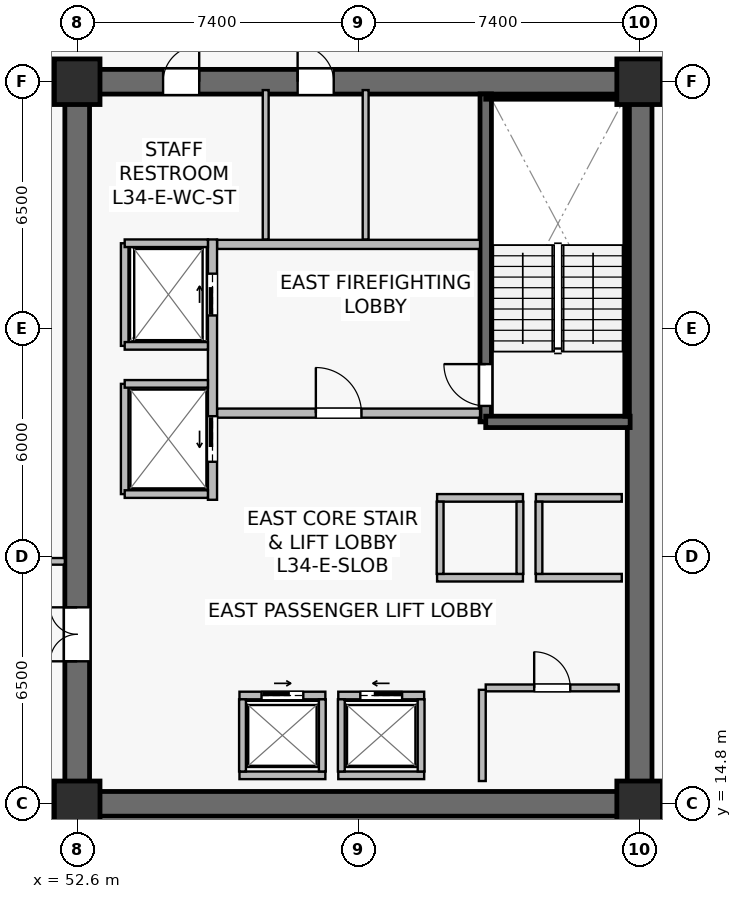
"""IFC4 building model, lengths in metres.
Left out: names, types, materials, properties, quantities, classifications, styles, units other than length and angle.
Written with IfcOpenShell. Run it as: python <this file> out.ifc"""

import sys

from ifc_helpers import new_model, si_unit, direction, frame, frame_2d, origin, origin_2d, place, context, subcontext, project, spatial, rectangle, extrude, source, transform, mapped, element, fill, save


model = new_model("IFC4")
c1 = context("Model", 3, precision=1e-05, world=origin(), true_north=direction((0.0, 1.0)))
c2 = subcontext(c1, "Body", "Model", "MODEL_VIEW")
j1 = project(units=[si_unit("LENGTHUNIT", "METRE"), si_unit("PLANEANGLEUNIT", "RADIAN")], contexts=[c1])
p1 = place(None, origin())
s1 = spatial("IfcSite", under=j1, at=p1, CompositionType="ELEMENT")
p2 = place(p1, origin())
s2 = spatial("IfcBuilding", under=s1, at=p2, CompositionType="ELEMENT")
p3 = place(p2, frame((0.0, 0.0, 142.0)))
s3 = spatial("IfcBuildingStorey", under=s2, at=p3, CompositionType="ELEMENT", Elevation=142.0)
p4 = place(p3, frame((52.275, 14.8, 0.0), z_axis=(0.0, 0.0, 1.0), x_axis=(1.0, 0.0, 0.0)))
e1 = element("IfcWall", 1, at=p4, inside=s3, PredefinedType="SHEAR", context=c2, shape_type="SweptSolid", body=[
    extrude(rectangle(XDim=15.45, YDim=0.65, at=frame_2d((7.725, 0.0))), origin(), (0.0, 0.0, 1.0), 3.79),
])
p5 = place(p3, frame((52.275, 33.8, 0.0), z_axis=(0.0, 0.0, 1.0), x_axis=(1.0, 0.0, 0.0)))
e2 = element("IfcWall", 2, at=p5, inside=s3, PredefinedType="SHEAR", context=c2, shape_type="SweptSolid", body=[
    extrude(rectangle(XDim=15.45, YDim=0.65, at=frame_2d((7.725, 0.0))), origin(), (0.0, 0.0, 1.0), 3.79),
])
p6 = place(p5, frame((6.125, 0.0, 0.0)))
e3 = element("IfcOpeningElement", 3, at=p6, cuts=e2, PredefinedType="OPENING", context=c2, shape_type="SweptSolid", body=[
    extrude(rectangle(XDim=0.95, YDim=2.15, at=frame_2d((0.475, 1.075))), frame((0.0, 0.335, 0.0), z_axis=(0.0, -1.0, 0.0), x_axis=(1.0, 0.0, 0.0)), (0.0, 0.0, 1.0), 0.67),
])
p7 = place(p5, frame((2.585, 0.0, 0.0)))
e4 = element("IfcOpeningElement", 4, at=p7, cuts=e2, PredefinedType="OPENING", context=c2, shape_type="SweptSolid", body=[
    extrude(rectangle(XDim=0.95, YDim=2.15, at=frame_2d((0.475, 1.075))), frame((0.0, 0.335, 0.0), z_axis=(0.0, -1.0, 0.0), x_axis=(1.0, 0.0, 0.0)), (0.0, 0.0, 1.0), 0.67),
])
p8 = place(p3, frame((52.6, 15.125, 0.0), z_axis=(0.0, 0.0, 1.0), x_axis=(0.0, 1.0, 0.0)))
e5 = element("IfcWall", 5, at=p8, inside=s3, PredefinedType="SHEAR", context=c2, shape_type="SweptSolid", body=[
    extrude(rectangle(XDim=18.35, YDim=0.65, at=frame_2d((9.175, 0.0))), origin(), (0.0, 0.0, 1.0), 3.79),
])
p9 = place(p8, frame((3.425, 0.0, 0.0)))
e6 = element("IfcOpeningElement", 6, at=p9, cuts=e5, PredefinedType="OPENING", context=c2, shape_type="SweptSolid", body=[
    extrude(rectangle(XDim=1.42, YDim=2.2, at=frame_2d((0.71, 1.1))), frame((0.0, 0.335, 0.0), z_axis=(0.0, -1.0, 0.0), x_axis=(1.0, 0.0, 0.0)), (0.0, 0.0, 1.0), 0.67),
])
p10 = place(p3, frame((67.4, 15.125, 0.0), z_axis=(0.0, 0.0, 1.0), x_axis=(0.0, 1.0, 0.0)))
e7 = element("IfcWall", 7, at=p10, inside=s3, PredefinedType="SHEAR", context=c2, shape_type="SweptSolid", body=[
    extrude(rectangle(XDim=18.35, YDim=0.65, at=frame_2d((9.175, 0.0))), origin(), (0.0, 0.0, 1.0), 3.79),
])
p11 = place(p3, frame((63.35, 24.85, 0.0), z_axis=(0.0, 0.0, 1.0), x_axis=(0.0, 1.0, 0.0)))
e8 = element("IfcWall", 8, at=p11, inside=s3, PredefinedType="SHEAR", context=c2, shape_type="SweptSolid", body=[
    extrude(rectangle(XDim=8.63, YDim=0.3, at=frame_2d((4.315, 0.0))), origin(), (0.0, 0.0, 1.0), 3.79),
])
p12 = place(p11, frame((0.42, 0.0, 0.0)))
e9 = element("IfcOpeningElement", 9, at=p12, cuts=e8, PredefinedType="OPENING", context=c2, shape_type="SweptSolid", body=[
    extrude(rectangle(XDim=1.1, YDim=2.15, at=frame_2d((0.55, 1.075))), frame((0.0, 0.16, 0.0), z_axis=(0.0, -1.0, 0.0), x_axis=(1.0, 0.0, 0.0)), (0.0, 0.0, 1.0), 0.32),
])
p13 = place(p3, frame((63.35, 24.85, 0.0), z_axis=(0.0, 0.0, 1.0), x_axis=(1.0, 0.0, 0.0)))
e10 = element("IfcWall", 10, at=p13, inside=s3, PredefinedType="SHEAR", context=c2, shape_type="SweptSolid", body=[
    extrude(rectangle(XDim=3.8, YDim=0.3, at=frame_2d((1.9, 0.0))), origin(), (0.0, 0.0, 1.0), 3.79),
])
p14 = place(p3, frame((63.35, 33.4, 0.0), z_axis=(0.0, 0.0, 1.0), x_axis=(1.0, 0.0, 0.0)))
e11 = element("IfcWall", 11, at=p14, inside=s3, PredefinedType="SOLIDWALL", context=c2, shape_type="SweptSolid", body=[
    extrude(rectangle(XDim=3.72, YDim=0.12, at=frame_2d((1.86, 0.0))), origin(), (0.0, 0.0, 1.0), 3.79),
])
p15 = place(p3, frame((67.07, 25.0, 0.0), z_axis=(0.0, 0.0, 1.0), x_axis=(0.0, 1.0, 0.0)))
e12 = element("IfcWall", 12, at=p15, inside=s3, PredefinedType="SOLIDWALL", context=c2, shape_type="SweptSolid", body=[
    extrude(rectangle(XDim=8.32, YDim=0.12, at=frame_2d((4.16, 0.0))), origin(), (0.0, 0.0, 1.0), 3.79),
])
m1 = source(origin(), c2, "Body", "SweptSolid", [
    extrude(rectangle(XDim=1.2, YDim=1.2, at=origin_2d()), origin(), (0.0, 0.0, 1.0), 4.1),
])
for number, where, z_axis, x_axis in (
    (13, (52.6, 14.8, 0.0), (0.0, 0.0, 1.0), (1.0, 0.0, 0.0)),
    (14, (67.4, 14.8, 0.0), (0.0, 0.0, 1.0), (1.0, 0.0, 0.0)),
    (15, (52.6, 33.8, 0.0), (0.0, 0.0, 1.0), (1.0, 0.0, 0.0)),
    (16, (67.4, 33.8, 0.0), (0.0, 0.0, 1.0), (1.0, 0.0, 0.0)),
):
    element("IfcColumn", number, at=place(p3, frame(where, z_axis=z_axis, x_axis=x_axis)), inside=s3, PredefinedType="COLUMN", context=c2, shape_type="MappedRepresentation", body=[
        mapped(m1, transform((0.0, 0.0, 0.0), scale=1.0)),
    ])
p16 = place(p3, frame((56.28, 25.08, 0.0), z_axis=(0.0, 0.0, 1.0), x_axis=(1.0, 0.0, 0.0)))
e17 = element("IfcWall", 17, at=p16, inside=s3, PredefinedType="SOLIDWALL", context=c2, shape_type="SweptSolid", body=[
    extrude(rectangle(XDim=6.92, YDim=0.24, at=frame_2d((3.46, 0.0))), origin(), (0.0, 0.0, 1.0), 3.125),
])
p17 = place(p16, frame((2.6, 0.0, 0.0)))
e18 = element("IfcOpeningElement", 18, at=p17, cuts=e17, PredefinedType="OPENING", context=c2, shape_type="SweptSolid", body=[
    extrude(rectangle(XDim=1.2, YDim=2.16, at=frame_2d((0.6, 1.08))), frame((0.0, 0.13, 0.0), z_axis=(0.0, -1.0, 0.0), x_axis=(1.0, 0.0, 0.0)), (0.0, 0.0, 1.0), 0.26),
])
p18 = place(p3, frame((56.28, 29.52, 0.0), z_axis=(0.0, 0.0, 1.0), x_axis=(1.0, 0.0, 0.0)))
e19 = element("IfcWall", 19, at=p18, inside=s3, PredefinedType="SOLIDWALL", context=c2, shape_type="SweptSolid", body=[
    extrude(rectangle(XDim=6.92, YDim=0.24, at=frame_2d((3.46, 0.0))), origin(), (0.0, 0.0, 1.0), 3.125),
])
p19 = place(p3, frame((56.16, 22.8, 0.0), z_axis=(0.0, 0.0, 1.0), x_axis=(0.0, 1.0, 0.0)))
e20 = element("IfcWall", 20, at=p19, inside=s3, PredefinedType="SOLIDWALL", context=c2, shape_type="SweptSolid", body=[
    extrude(rectangle(XDim=6.85, YDim=0.24, at=frame_2d((3.425, 0.0))), origin(), (0.0, 0.0, 1.0), 2.875),
])
p20 = place(p19, frame((4.85, 0.0, 0.0)))
e21 = element("IfcOpeningElement", 21, at=p20, cuts=e20, PredefinedType="OPENING", context=c2, shape_type="SweptSolid", body=[
    extrude(rectangle(XDim=1.1, YDim=2.22, at=frame_2d((0.55, 1.11))), frame((0.0, 0.13, 0.0), z_axis=(0.0, -1.0, 0.0), x_axis=(1.0, 0.0, 0.0)), (0.0, 0.0, 1.0), 0.26),
])
p21 = place(p19, frame((1.0, 0.0, 0.0)))
e22 = element("IfcOpeningElement", 22, at=p21, cuts=e20, PredefinedType="OPENING", context=c2, shape_type="SweptSolid", body=[
    extrude(rectangle(XDim=1.2, YDim=2.22, at=frame_2d((0.6, 1.11))), frame((0.0, 0.13, 0.0), z_axis=(0.0, -1.0, 0.0), x_axis=(1.0, 0.0, 0.0)), (0.0, 0.0, 1.0), 0.26),
])
p22 = place(p3, frame((59.47, 17.65, 0.0), z_axis=(0.0, 0.0, 1.0), x_axis=(1.0, 0.0, 0.0)))
e23 = element("IfcWall", 23, at=p22, inside=s3, PredefinedType="SOLIDWALL", context=c2, shape_type="SweptSolid", body=[
    extrude(rectangle(XDim=2.26, YDim=0.2, at=frame_2d((1.13, 0.0))), origin(), (0.0, 0.0, 1.0), 3.125),
])
p23 = place(p22, frame((0.58, 0.0, 0.0)))
e24 = element("IfcOpeningElement", 24, at=p23, cuts=e23, PredefinedType="OPENING", context=c2, shape_type="SweptSolid", body=[
    extrude(rectangle(XDim=1.1, YDim=2.22, at=frame_2d((0.55, 1.11))), frame((0.0, 0.11, 0.0), z_axis=(0.0, -1.0, 0.0), x_axis=(1.0, 0.0, 0.0)), (0.0, 0.0, 1.0), 0.22),
])
p24 = place(p3, frame((59.47, 15.55, 0.0), z_axis=(0.0, 0.0, 1.0), x_axis=(1.0, 0.0, 0.0)))
e25 = element("IfcWall", 25, at=p24, inside=s3, PredefinedType="SOLIDWALL", context=c2, shape_type="SweptSolid", body=[
    extrude(rectangle(XDim=2.26, YDim=0.2, at=frame_2d((1.13, 0.0))), origin(), (0.0, 0.0, 1.0), 3.125),
])
for number, where, z_axis, x_axis in (
    (26, (59.55, 15.65, 0.0), (0.0, 0.0, 1.0), (0.0, 1.0, 0.0)),
    (27, (61.65, 15.65, 0.0), (0.0, 0.0, 1.0), (0.0, 1.0, 0.0)),
):
    element("IfcWall", number, at=place(p3, frame(where, z_axis=z_axis, x_axis=x_axis)), inside=s3, PredefinedType="SOLIDWALL", context=c2, shape_type="SweptSolid", body=[
        extrude(rectangle(XDim=1.9, YDim=0.18, at=frame_2d((0.95, 0.0))), origin(), (0.0, 0.0, 1.0), 3.79),
    ])
p25 = place(p3, frame((56.87, 17.65, 0.0), z_axis=(0.0, 0.0, 1.0), x_axis=(1.0, 0.0, 0.0)))
e28 = element("IfcWall", 28, at=p25, inside=s3, PredefinedType="SOLIDWALL", context=c2, shape_type="SweptSolid", body=[
    extrude(rectangle(XDim=2.26, YDim=0.2, at=frame_2d((1.13, 0.0))), origin(), (0.0, 0.0, 1.0), 3.79),
])
p26 = place(p25, frame((0.58, 0.0, 0.0)))
e29 = element("IfcOpeningElement", 29, at=p26, cuts=e28, PredefinedType="OPENING", context=c2, shape_type="SweptSolid", body=[
    extrude(rectangle(XDim=1.1, YDim=2.22, at=frame_2d((0.55, 1.11))), frame((0.0, 0.11, 0.0), z_axis=(0.0, -1.0, 0.0), x_axis=(1.0, 0.0, 0.0)), (0.0, 0.0, 1.0), 0.22),
])
p27 = place(p3, frame((56.87, 15.55, 0.0), z_axis=(0.0, 0.0, 1.0), x_axis=(1.0, 0.0, 0.0)))
e30 = element("IfcWall", 30, at=p27, inside=s3, PredefinedType="SOLIDWALL", context=c2, shape_type="SweptSolid", body=[
    extrude(rectangle(XDim=2.26, YDim=0.2, at=frame_2d((1.13, 0.0))), origin(), (0.0, 0.0, 1.0), 3.79),
])
for number, where, z_axis, x_axis in (
    (31, (56.95, 15.65, 0.0), (0.0, 0.0, 1.0), (0.0, 1.0, 0.0)),
    (32, (59.05, 15.65, 0.0), (0.0, 0.0, 1.0), (0.0, 1.0, 0.0)),
):
    element("IfcWall", number, at=place(p3, frame(where, z_axis=z_axis, x_axis=x_axis)), inside=s3, PredefinedType="SOLIDWALL", context=c2, shape_type="SweptSolid", body=[
        extrude(rectangle(XDim=1.9, YDim=0.18, at=frame_2d((0.95, 0.0))), origin(), (0.0, 0.0, 1.0), 3.79),
    ])
for number, where, z_axis, x_axis in (
    (33, (64.67, 20.75, 0.0), (0.0, 0.0, 1.0), (1.0, 0.0, 0.0)),
    (34, (64.67, 22.85, 0.0), (0.0, 0.0, 1.0), (1.0, 0.0, 0.0)),
):
    element("IfcWall", number, at=place(p3, frame(where, z_axis=z_axis, x_axis=x_axis)), inside=s3, PredefinedType="SOLIDWALL", context=c2, shape_type="SweptSolid", body=[
        extrude(rectangle(XDim=2.26, YDim=0.2, at=frame_2d((1.13, 0.0))), origin(), (0.0, 0.0, 1.0), 3.79),
    ])
p28 = place(p3, frame((64.75, 20.85, 0.0), z_axis=(0.0, 0.0, 1.0), x_axis=(0.0, 1.0, 0.0)))
e35 = element("IfcWall", 35, at=p28, inside=s3, PredefinedType="SOLIDWALL", context=c2, shape_type="SweptSolid", body=[
    extrude(rectangle(XDim=1.9, YDim=0.18, at=frame_2d((0.95, 0.0))), origin(), (0.0, 0.0, 1.0), 3.79),
])
for number, where, z_axis, x_axis in (
    (36, (62.07, 20.75, 0.0), (0.0, 0.0, 1.0), (1.0, 0.0, 0.0)),
    (37, (62.07, 22.85, 0.0), (0.0, 0.0, 1.0), (1.0, 0.0, 0.0)),
):
    element("IfcWall", number, at=place(p3, frame(where, z_axis=z_axis, x_axis=x_axis)), inside=s3, PredefinedType="SOLIDWALL", context=c2, shape_type="SweptSolid", body=[
        extrude(rectangle(XDim=2.26, YDim=0.2, at=frame_2d((1.13, 0.0))), origin(), (0.0, 0.0, 1.0), 3.79),
    ])
for number, where, z_axis, x_axis in (
    (38, (62.15, 20.85, 0.0), (0.0, 0.0, 1.0), (0.0, 1.0, 0.0)),
    (39, (64.25, 20.85, 0.0), (0.0, 0.0, 1.0), (0.0, 1.0, 0.0)),
):
    element("IfcWall", number, at=place(p3, frame(where, z_axis=z_axis, x_axis=x_axis)), inside=s3, PredefinedType="SOLIDWALL", context=c2, shape_type="SweptSolid", body=[
        extrude(rectangle(XDim=1.9, YDim=0.18, at=frame_2d((0.95, 0.0))), origin(), (0.0, 0.0, 1.0), 3.79),
    ])
p29 = place(p3, frame((53.85, 26.85, 0.0), z_axis=(0.0, 0.0, 1.0), x_axis=(0.0, 1.0, 0.0)))
e40 = element("IfcWall", 40, at=p29, inside=s3, PredefinedType="SOLIDWALL", context=c2, shape_type="SweptSolid", body=[
    extrude(rectangle(XDim=2.7, YDim=0.2, at=frame_2d((1.35, 0.0))), origin(), (0.0, 0.0, 1.0), 3.79),
])
p30 = place(p3, frame((53.85, 29.55, 0.0), z_axis=(0.0, 0.0, 1.0), x_axis=(1.0, 0.0, 0.0)))
e41 = element("IfcWall", 41, at=p30, inside=s3, PredefinedType="SOLIDWALL", context=c2, shape_type="SweptSolid", body=[
    extrude(rectangle(XDim=2.19, YDim=0.2, at=frame_2d((1.095, 0.0))), origin(), (0.0, 0.0, 1.0), 3.79),
])
p31 = place(p3, frame((53.85, 26.85, 0.0), z_axis=(0.0, 0.0, 1.0), x_axis=(1.0, 0.0, 0.0)))
e42 = element("IfcWall", 42, at=p31, inside=s3, PredefinedType="SOLIDWALL", context=c2, shape_type="SweptSolid", body=[
    extrude(rectangle(XDim=2.19, YDim=0.2, at=frame_2d((1.095, 0.0))), origin(), (0.0, 0.0, 1.0), 3.187),
])
p32 = place(p3, frame((53.85, 22.95, 0.0), z_axis=(0.0, 0.0, 1.0), x_axis=(0.0, 1.0, 0.0)))
e43 = element("IfcWall", 43, at=p32, inside=s3, PredefinedType="SOLIDWALL", context=c2, shape_type="SweptSolid", body=[
    extrude(rectangle(XDim=2.9, YDim=0.2, at=frame_2d((1.45, 0.0))), origin(), (0.0, 0.0, 1.0), 2.875),
])
for number, where, z_axis, x_axis in (
    (44, (53.85, 25.85, 0.0), (0.0, 0.0, 1.0), (1.0, 0.0, 0.0)),
    (45, (53.85, 22.95, 0.0), (0.0, 0.0, 1.0), (1.0, 0.0, 0.0)),
):
    element("IfcWall", number, at=place(p3, frame(where, z_axis=z_axis, x_axis=x_axis)), inside=s3, PredefinedType="SOLIDWALL", context=c2, shape_type="SweptSolid", body=[
        extrude(rectangle(XDim=2.19, YDim=0.2, at=frame_2d((1.095, 0.0))), origin(), (0.0, 0.0, 1.0), 3.79),
    ])
p33 = place(p3, frame((63.35, 17.85, 0.0), z_axis=(0.0, 0.0, 1.0), x_axis=(1.0, 0.0, 0.0)))
e46 = element("IfcWall", 46, at=p33, inside=s3, PredefinedType="SOLIDWALL", context=c2, shape_type="SweptSolid", body=[
    extrude(rectangle(XDim=3.5, YDim=0.18, at=frame_2d((1.75, 0.0))), origin(), (0.0, 0.0, 1.0), 3.79),
])
p34 = place(p33, frame((1.275, 0.0, 0.0)))
e47 = element("IfcOpeningElement", 47, at=p34, cuts=e46, PredefinedType="OPENING", context=c2, shape_type="SweptSolid", body=[
    extrude(rectangle(XDim=0.95, YDim=2.15, at=frame_2d((0.475, 1.075))), frame((0.0, 0.1, 0.0), z_axis=(0.0, -1.0, 0.0), x_axis=(1.0, 0.0, 0.0)), (0.0, 0.0, 1.0), 0.2),
])
p35 = place(p3, frame((63.26, 15.4, 0.0), z_axis=(0.0, 0.0, 1.0), x_axis=(0.0, 1.0, 0.0)))
e48 = element("IfcWall", 48, at=p35, inside=s3, PredefinedType="SOLIDWALL", context=c2, shape_type="SweptSolid", body=[
    extrude(rectangle(XDim=2.4, YDim=0.18, at=frame_2d((1.2, 0.0))), origin(), (0.0, 0.0, 1.0), 3.79),
])
p36 = place(p3, frame((60.19, 29.65, 0.0), z_axis=(0.0, 0.0, 1.0), x_axis=(0.0, 1.0, 0.0)))
e49 = element("IfcWall", 49, at=p36, inside=s3, PredefinedType="PLUMBINGWALL", context=c2, shape_type="SweptSolid", body=[
    extrude(rectangle(XDim=3.93, YDim=0.155, at=frame_2d((1.965, 0.0))), origin(), (0.0, 0.0, 1.0), 3.125),
])
p37 = place(p3, frame((57.56, 29.65, 0.0), z_axis=(0.0, 0.0, 1.0), x_axis=(0.0, 1.0, 0.0)))
e50 = element("IfcWall", 50, at=p37, inside=s3, PredefinedType="PLUMBINGWALL", context=c2, shape_type="SweptSolid", body=[
    extrude(rectangle(XDim=3.93, YDim=0.155, at=frame_2d((1.965, 0.0))), origin(), (0.0, 0.0, 1.0), 3.79),
])
p38 = place(p3, frame((48.3, 34.26, 0.0), z_axis=(0.0, 0.0, 1.0), x_axis=(1.0, 0.0, 0.0)))
e51 = element("IfcWall", 51, at=p38, inside=s3, PredefinedType="PARTITIONING", context=c2, shape_type="SweptSolid", body=[
    extrude(rectangle(XDim=3.975, YDim=0.175, at=frame_2d((1.987, 0.0))), origin(), (0.0, 0.0, 1.0), 3.475),
])
p39 = place(p3, frame((48.3, 21.18, 0.0), z_axis=(0.0, 0.0, 1.0), x_axis=(1.0, 0.0, 0.0)))
e52 = element("IfcWall", 52, at=p39, inside=s3, PredefinedType="PARTITIONING", context=c2, shape_type="SweptSolid", body=[
    extrude(rectangle(XDim=3.975, YDim=0.175, at=frame_2d((1.987, 0.0))), origin(), (0.0, 0.0, 1.0), 3.79),
])
p40 = place(p39, frame((1.35, 0.0, 0.0)))
e53 = element("IfcOpeningElement", 53, at=p40, cuts=e52, PredefinedType="OPENING", context=c2, shape_type="SweptSolid", body=[
    extrude(rectangle(XDim=0.95, YDim=2.15, at=frame_2d((0.475, 1.075))), frame((0.0, 0.098, 0.0), z_axis=(0.0, -1.0, 0.0), x_axis=(1.0, 0.0, 0.0)), (0.0, 0.0, 1.0), 0.195),
])
m2 = source(origin(), c2, "Body", "SweptSolid", [
    extrude(rectangle(XDim=1.1, YDim=2.15, at=frame_2d((0.55, 1.075))), frame((0.0, 0.025, 0.0), z_axis=(0.0, -1.0, 0.0), x_axis=(1.0, 0.0, 0.0)), (0.0, 0.0, 1.0), 0.05),
])
p41 = place(p12, origin())
e54 = element("IfcDoor", 54, at=p41, inside=s3, OperationType="SINGLE_SWING_RIGHT", PredefinedType="DOOR", context=c2, shape_type="MappedRepresentation", body=[
    mapped(m2, transform((0.0, 0.0, 0.0), scale=1.0)),
])
fill(e9, e54)
m3 = source(origin(), c2, "Body", "SweptSolid", [
    extrude(rectangle(XDim=1.2, YDim=2.16, at=frame_2d((0.6, 1.08))), frame((0.0, 0.025, 0.0), z_axis=(0.0, -1.0, 0.0), x_axis=(1.0, 0.0, 0.0)), (0.0, 0.0, 1.0), 0.05),
])
p42 = place(p17, origin())
e55 = element("IfcDoor", 55, at=p42, inside=s3, OperationType="SINGLE_SWING_LEFT", PredefinedType="DOOR", context=c2, shape_type="MappedRepresentation", body=[
    mapped(m3, transform((0.0, 0.0, 0.0), scale=1.0)),
])
fill(e18, e55)
m4 = source(origin(), c2, "Body", "SweptSolid", [
    extrude(rectangle(XDim=1.1, YDim=2.22, at=frame_2d((0.55, 1.11))), frame((0.0, 0.025, 0.0), z_axis=(0.0, -1.0, 0.0), x_axis=(1.0, 0.0, 0.0)), (0.0, 0.0, 1.0), 0.05),
])
p43 = place(p23, origin())
e56 = element("IfcDoor", 56, at=p43, inside=s3, OperationType="SLIDING_TO_LEFT", PredefinedType="USERDEFINED", context=c2, shape_type="MappedRepresentation", body=[
    mapped(m4, transform((0.0, 0.0, 0.0), scale=1.0)),
])
fill(e24, e56)
p44 = place(p26, origin())
e57 = element("IfcDoor", 57, at=p44, inside=s3, OperationType="SLIDING_TO_RIGHT", PredefinedType="USERDEFINED", context=c2, shape_type="MappedRepresentation", body=[
    mapped(m4, transform((0.0, 0.0, 0.0), scale=1.0)),
])
fill(e29, e57)
p45 = place(p20, origin())
e58 = element("IfcDoor", 58, at=p45, inside=s3, OperationType="SLIDING_TO_RIGHT", PredefinedType="USERDEFINED", context=c2, shape_type="MappedRepresentation", body=[
    mapped(m4, transform((0.0, 0.0, 0.0), scale=1.0)),
])
fill(e21, e58)
m5 = source(origin(), c2, "Body", "SweptSolid", [
    extrude(rectangle(XDim=1.2, YDim=2.22, at=frame_2d((0.6, 1.11))), frame((0.0, 0.025, 0.0), z_axis=(0.0, -1.0, 0.0), x_axis=(1.0, 0.0, 0.0)), (0.0, 0.0, 1.0), 0.05),
])
p46 = place(p21, origin())
e59 = element("IfcDoor", 59, at=p46, inside=s3, OperationType="SLIDING_TO_LEFT", PredefinedType="USERDEFINED", context=c2, shape_type="MappedRepresentation", body=[
    mapped(m5, transform((0.0, 0.0, 0.0), scale=1.0)),
])
fill(e22, e59)
m6 = source(origin(), c2, "Body", "SweptSolid", [
    extrude(rectangle(XDim=0.95, YDim=2.15, at=frame_2d((0.475, 1.075))), frame((0.0, 0.025, 0.0), z_axis=(0.0, -1.0, 0.0), x_axis=(1.0, 0.0, 0.0)), (0.0, 0.0, 1.0), 0.05),
])
p47 = place(p34, origin())
e60 = element("IfcDoor", 60, at=p47, inside=s3, OperationType="SINGLE_SWING_LEFT", PredefinedType="DOOR", context=c2, shape_type="MappedRepresentation", body=[
    mapped(m6, transform((0.0, 0.0, 0.0), scale=1.0)),
])
fill(e47, e60)
m7 = source(origin(), c2, "Body", "SweptSolid", [
    extrude(rectangle(XDim=1.42, YDim=2.2, at=frame_2d((0.71, 1.1))), frame((0.0, 0.025, 0.0), z_axis=(0.0, -1.0, 0.0), x_axis=(1.0, 0.0, 0.0)), (0.0, 0.0, 1.0), 0.05),
])
p48 = place(p9, origin())
e61 = element("IfcDoor", 61, at=p48, inside=s3, OperationType="DOUBLE_DOOR_SINGLE_SWING", PredefinedType="DOOR", context=c2, shape_type="MappedRepresentation", body=[
    mapped(m7, transform((0.0, 0.0, 0.0), scale=1.0)),
])
fill(e6, e61)
p49 = place(p6, origin())
e62 = element("IfcDoor", 62, at=p49, inside=s3, OperationType="SINGLE_SWING_LEFT", PredefinedType="DOOR", context=c2, shape_type="MappedRepresentation", body=[
    mapped(m6, transform((0.0, 0.0, 0.0), scale=1.0)),
])
fill(e3, e62)
p50 = place(p7, origin())
e63 = element("IfcDoor", 63, at=p50, inside=s3, OperationType="SINGLE_SWING_RIGHT", PredefinedType="DOOR", context=c2, shape_type="MappedRepresentation", body=[
    mapped(m6, transform((0.0, 0.0, 0.0), scale=1.0)),
])
fill(e4, e63)
save(model, sys.argv[1])
